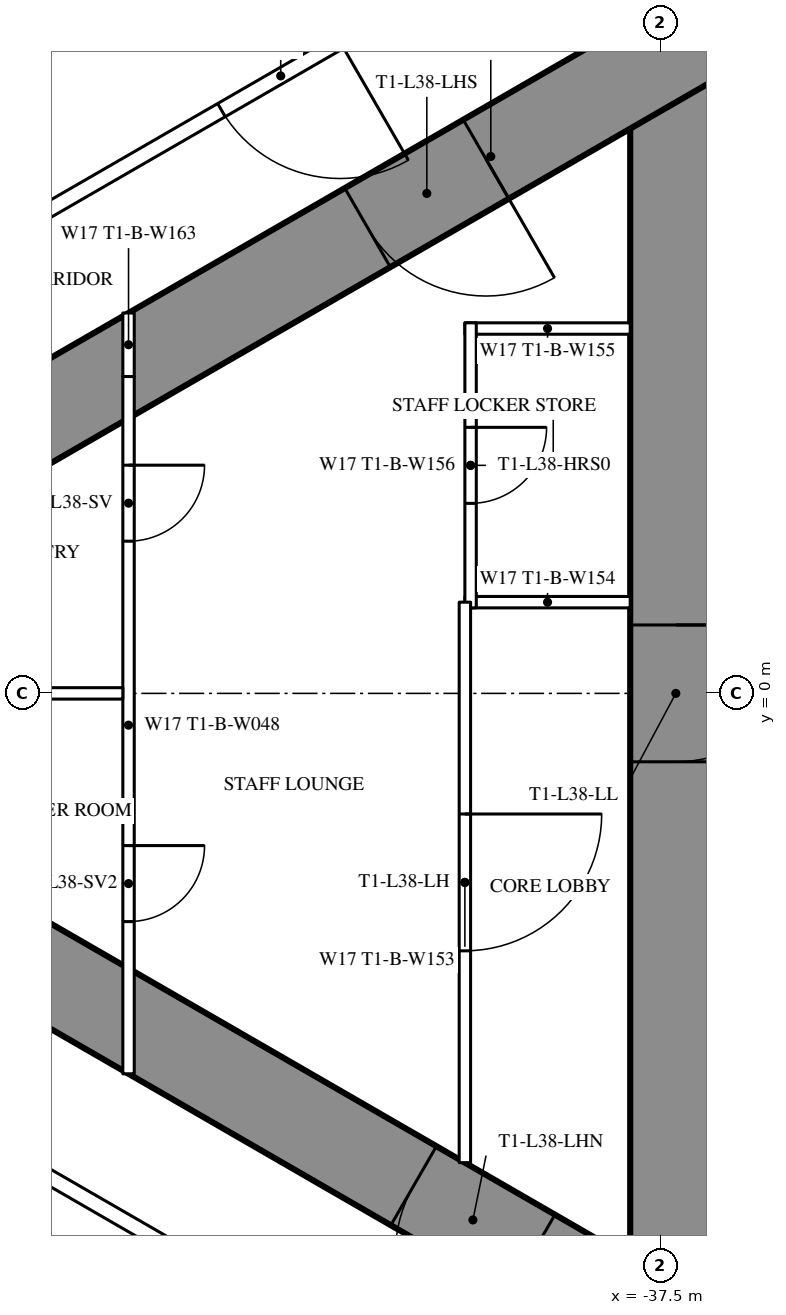
"""IFC4 building model, lengths in metres.
Left out: names, types, materials, properties, quantities, classifications, styles, units other than length and angle.
Written with IfcOpenShell. Run it as: python <this file> out.ifc"""

import sys

from ifc_helpers import new_model, si_unit, direction, frame, frame_2d, origin, place, context, subcontext, project, spatial, rectangle, extrude, element, fill, save


model = new_model("IFC4")
c1 = context("Model", 3, precision=1e-05, world=origin(), true_north=direction((0.0, 1.0)))
c2 = subcontext(c1, "Body", "Model", "MODEL_VIEW")
j1 = project(units=[si_unit("LENGTHUNIT", "METRE"), si_unit("PLANEANGLEUNIT", "RADIAN")], contexts=[c1])
p1 = place(None, origin())
s1 = spatial("IfcSite", under=j1, at=p1, CompositionType="ELEMENT")
p2 = place(p1, origin())
s2 = spatial("IfcBuilding", under=s1, at=p2, CompositionType="ELEMENT")
p3 = place(p2, frame((0.0, 0.0, 143.1)))
s3 = spatial("IfcBuildingStorey", under=s2, at=p3, CompositionType="ELEMENT", Elevation=143.1)
p4 = place(p3, frame((-37.3, 8.6, 0.0), z_axis=(0.0, 0.0, 1.0), x_axis=(0.0, -1.0, 0.0)))
e1 = element("IfcWall", 1, at=p4, inside=s3, PredefinedType="SHEAR", context=c2, shape_type="SweptSolid", body=[
    extrude(rectangle(XDim=17.2, YDim=1.2, at=frame_2d((8.6, 0.0))), origin(), (0.0, 0.0, 1.0), 3.6),
])
p5 = place(p4, frame((7.7, 0.0, 0.0)))
e2 = element("IfcOpeningElement", 2, at=p5, cuts=e1, PredefinedType="OPENING", context=c2, shape_type="SweptSolid", body=[
    extrude(rectangle(XDim=1.8, YDim=2.2, at=frame_2d((0.9, 1.1))), frame((0.0, 0.61, 0.0), z_axis=(0.0, -1.0, 0.0), x_axis=(1.0, 0.0, 0.0)), (0.0, 0.0, 1.0), 1.22),
])
p6 = place(p3, frame((-27.2, 14.3, 0.0), z_axis=(0.0, 0.0, 1.0), x_axis=(-0.866026593062, -0.499997940104, 0.0)))
e3 = element("IfcWall", 3, at=p6, inside=s3, PredefinedType="SHEAR", context=c2, shape_type="SweptSolid", body=[
    extrude(rectangle(XDim=28.946, YDim=1.2, at=frame_2d((14.473, 0.0))), origin(), (0.0, 0.0, 1.0), 3.6),
])
p7 = place(p6, frame((4.6, 0.0, 0.0)))
e4 = element("IfcOpeningElement", 4, at=p7, cuts=e3, PredefinedType="OPENING", context=c2, shape_type="SweptSolid", body=[
    extrude(rectangle(XDim=1.0, YDim=2.2, at=frame_2d((0.5, 1.1))), frame((0.0, 0.61, 0.0), z_axis=(0.0, -1.0, 0.0), x_axis=(1.0, 0.0, 0.0)), (0.0, 0.0, 1.0), 1.22),
])
p8 = place(p6, frame((14.545, 0.0, 0.0)))
e5 = element("IfcOpeningElement", 5, at=p8, cuts=e3, PredefinedType="OPENING", context=c2, shape_type="SweptSolid", body=[
    extrude(rectangle(XDim=1.8, YDim=2.2, at=frame_2d((0.9, 1.1))), frame((0.0, 0.61, 0.0), z_axis=(0.0, -1.0, 0.0), x_axis=(1.0, 0.0, 0.0)), (0.0, 0.0, 1.0), 1.22),
])
p9 = place(p3, frame((-27.2, -14.3, 0.0), z_axis=(0.0, 0.0, 1.0), x_axis=(-0.866024021859, 0.500002393557, 0.0)))
e6 = element("IfcWall", 6, at=p9, inside=s3, PredefinedType="SHEAR", context=c2, shape_type="SweptSolid", body=[
    extrude(rectangle(XDim=27.907, YDim=1.2, at=frame_2d((13.954, 0.0))), origin(), (0.0, 0.0, 1.0), 3.6),
])
p10 = place(p9, frame((4.6, 0.0, 0.0)))
e7 = element("IfcOpeningElement", 7, at=p10, cuts=e6, PredefinedType="OPENING", context=c2, shape_type="SweptSolid", body=[
    extrude(rectangle(XDim=1.0, YDim=2.2, at=frame_2d((0.5, 1.1))), frame((0.0, 0.61, 0.0), z_axis=(0.0, -1.0, 0.0), x_axis=(1.0, 0.0, 0.0)), (0.0, 0.0, 1.0), 1.22),
])
p11 = place(p9, frame((13.845, 0.0, 0.0)))
e8 = element("IfcOpeningElement", 8, at=p11, cuts=e6, PredefinedType="OPENING", context=c2, shape_type="SweptSolid", body=[
    extrude(rectangle(XDim=1.8, YDim=2.2, at=frame_2d((0.9, 1.1))), frame((0.0, 0.61, 0.0), z_axis=(0.0, -1.0, 0.0), x_axis=(1.0, 0.0, 0.0)), (0.0, 0.0, 1.0), 1.22),
])
p12 = place(p3, frame((-37.7, 10.894, 0.0), z_axis=(0.0, 0.0, 1.0), x_axis=(-0.866027905338, -0.499995667157, 0.0)))
e9 = element("IfcWall", 9, at=p12, inside=s3, PredefinedType="PARTITIONING", context=c2, shape_type="SweptSolid", body=[
    extrude(rectangle(XDim=21.787, YDim=0.2, at=frame_2d((10.894, 0.0))), origin(), (0.0, 0.0, 1.0), 3.35),
])
p13 = place(p12, frame((14.296, 0.0, 0.0)))
e10 = element("IfcOpeningElement", 10, at=p13, cuts=e9, PredefinedType="OPENING", context=c2, shape_type="SweptSolid", body=[
    extrude(rectangle(XDim=1.8, YDim=2.2, at=frame_2d((0.9, 1.1))), frame((0.0, 0.11, 0.0), z_axis=(0.0, -1.0, 0.0), x_axis=(1.0, 0.0, 0.0)), (0.0, 0.0, 1.0), 0.22),
])
p14 = place(p12, frame((19.399, 0.0, 0.0)))
e11 = element("IfcOpeningElement", 11, at=p14, cuts=e9, PredefinedType="OPENING", context=c2, shape_type="SweptSolid", body=[
    extrude(rectangle(XDim=1.8, YDim=2.14, at=frame_2d((0.9, 1.07))), frame((0.0, 0.11, 0.0), z_axis=(0.0, -1.0, 0.0), x_axis=(1.0, 0.0, 0.0)), (0.0, 0.0, 1.0), 0.22),
])
p15 = place(p12, frame((4.64, 0.0, 0.0)))
e12 = element("IfcOpeningElement", 12, at=p15, cuts=e9, PredefinedType="OPENING", context=c2, shape_type="SweptSolid", body=[
    extrude(rectangle(XDim=1.8, YDim=2.2, at=frame_2d((0.9, 1.1))), frame((0.0, 0.11, 0.0), z_axis=(0.0, -1.0, 0.0), x_axis=(1.0, 0.0, 0.0)), (0.0, 0.0, 1.0), 0.22),
])
p16 = place(p3, frame((-36.92, -11.344, 0.0), z_axis=(0.0, 0.0, 1.0), x_axis=(-0.866028313256, 0.499994960614, 0.0)))
e13 = element("IfcWall", 13, at=p16, inside=s3, PredefinedType="PARTITIONING", context=c2, shape_type="SweptSolid", body=[
    extrude(rectangle(XDim=22.568, YDim=0.2, at=frame_2d((11.284, 0.0))), origin(), (0.0, 0.0, 1.0), 3.35),
])
p17 = place(p16, frame((20.24, 0.0, 0.0)))
e14 = element("IfcOpeningElement", 14, at=p17, cuts=e13, PredefinedType="OPENING", context=c2, shape_type="SweptSolid", body=[
    extrude(rectangle(XDim=1.8, YDim=2.14, at=frame_2d((0.9, 1.07))), frame((0.0, 0.11, 0.0), z_axis=(0.0, -1.0, 0.0), x_axis=(1.0, 0.0, 0.0)), (0.0, 0.0, 1.0), 0.22),
])
p18 = place(p16, frame((14.946, 0.0, 0.0)))
e15 = element("IfcOpeningElement", 15, at=p18, cuts=e13, PredefinedType="OPENING", context=c2, shape_type="SweptSolid", body=[
    extrude(rectangle(XDim=1.8, YDim=2.2, at=frame_2d((0.9, 1.1))), frame((0.0, 0.11, 0.0), z_axis=(0.0, -1.0, 0.0), x_axis=(1.0, 0.0, 0.0)), (0.0, 0.0, 1.0), 0.22),
])
p19 = place(p16, frame((5.091, 0.0, 0.0)))
e16 = element("IfcOpeningElement", 16, at=p19, cuts=e13, PredefinedType="OPENING", context=c2, shape_type="SweptSolid", body=[
    extrude(rectangle(XDim=1.8, YDim=2.2, at=frame_2d((0.9, 1.1))), frame((0.0, 0.11, 0.0), z_axis=(0.0, -1.0, 0.0), x_axis=(1.0, 0.0, 0.0)), (0.0, 0.0, 1.0), 0.22),
])
for number, where, z_axis, x_axis in (
    (17, (-37.9, 1.2, 0.0), (0.0, 0.0, 1.0), (-1.0, 0.0, 0.0)),
    (18, (-37.9, 4.8, 0.0), (0.0, 0.0, 1.0), (-1.0, 0.0, 0.0)),
):
    element("IfcWall", number, at=place(p3, frame(where, z_axis=z_axis, x_axis=x_axis)), inside=s3, PredefinedType="PARTITIONING", context=c2, shape_type="SweptSolid", body=[
        extrude(rectangle(XDim=2.175, YDim=0.15, at=frame_2d((1.087, 0.0))), origin(), (0.0, 0.0, 1.0), 3.35),
    ])
p20 = place(p3, frame((-40.0, 4.875, 0.0), z_axis=(0.0, 0.0, 1.0), x_axis=(0.0, -1.0, 0.0)))
e19 = element("IfcWall", 19, at=p20, inside=s3, PredefinedType="PARTITIONING", context=c2, shape_type="SweptSolid", body=[
    extrude(rectangle(XDim=3.75, YDim=0.15, at=frame_2d((1.875, 0.0))), origin(), (0.0, 0.0, 1.0), 3.35),
])
p21 = place(p20, frame((1.375, 0.0, 0.0)))
e20 = element("IfcOpeningElement", 20, at=p21, cuts=e19, PredefinedType="OPENING", context=c2, shape_type="SweptSolid", body=[
    extrude(rectangle(XDim=1.0, YDim=2.2, at=frame_2d((0.5, 1.1))), frame((0.0, 0.085, 0.0), z_axis=(0.0, -1.0, 0.0), x_axis=(1.0, 0.0, 0.0)), (0.0, 0.0, 1.0), 0.17),
])
p22 = place(p3, frame((-40.075, 1.2, 0.0), z_axis=(0.0, 0.0, 1.0), x_axis=(0.0, -1.0, 0.0)))
e21 = element("IfcWall", 21, at=p22, inside=s3, PredefinedType="PARTITIONING", context=c2, shape_type="SweptSolid", body=[
    extrude(rectangle(XDim=7.374, YDim=0.15, at=frame_2d((3.687, 0.0))), origin(), (0.0, 0.0, 1.0), 3.35),
])
p23 = place(p22, frame((2.787, 0.0, 0.0)))
e22 = element("IfcOpeningElement", 22, at=p23, cuts=e21, PredefinedType="OPENING", context=c2, shape_type="SweptSolid", body=[
    extrude(rectangle(XDim=1.8, YDim=2.2, at=frame_2d((0.9, 1.1))), frame((0.0, 0.085, 0.0), z_axis=(0.0, -1.0, 0.0), x_axis=(1.0, 0.0, 0.0)), (0.0, 0.0, 1.0), 0.17),
])
p24 = place(p3, frame((-44.5, 4.169, 0.0), z_axis=(0.0, 0.0, 1.0), x_axis=(0.0, -1.0, 0.0)))
e23 = element("IfcWall", 23, at=p24, inside=s3, PredefinedType="PARTITIONING", context=c2, shape_type="SweptSolid", body=[
    extrude(rectangle(XDim=9.173, YDim=0.15, at=frame_2d((4.587, 0.0))), origin(), (0.0, 0.0, 1.0), 3.35),
])
p25 = place(p24, frame((1.167, 0.0, 0.0)))
e24 = element("IfcOpeningElement", 24, at=p25, cuts=e23, PredefinedType="OPENING", context=c2, shape_type="SweptSolid", body=[
    extrude(rectangle(XDim=1.0, YDim=2.2, at=frame_2d((0.5, 1.1))), frame((0.0, 0.085, 0.0), z_axis=(0.0, -1.0, 0.0), x_axis=(1.0, 0.0, 0.0)), (0.0, 0.0, 1.0), 0.17),
])
p26 = place(p24, frame((6.171, 0.0, 0.0)))
e25 = element("IfcOpeningElement", 25, at=p26, cuts=e23, PredefinedType="OPENING", context=c2, shape_type="SweptSolid", body=[
    extrude(rectangle(XDim=1.0, YDim=2.2, at=frame_2d((0.5, 1.1))), frame((0.0, 0.085, 0.0), z_axis=(0.0, -1.0, 0.0), x_axis=(1.0, 0.0, 0.0)), (0.0, 0.0, 1.0), 0.17),
])
p27 = place(p3, frame((-44.575, 0.0, 0.0), z_axis=(0.0, 0.0, 1.0), x_axis=(-1.0, 0.0, 0.0)))
e26 = element("IfcWall", 26, at=p27, inside=s3, PredefinedType="PARTITIONING", context=c2, shape_type="SweptSolid", body=[
    extrude(rectangle(XDim=8.593, YDim=0.15, at=frame_2d((4.297, 0.0))), origin(), (0.0, 0.0, 1.0), 2.15),
])
p28 = place(p3, frame((-44.5, 5.005, 0.0), z_axis=(0.0, 0.0, 1.0), x_axis=(0.0, -1.0, 0.0)))
e27 = element("IfcWall", 27, at=p28, inside=s3, PredefinedType="PARTITIONING", context=c2, shape_type="SweptSolid", body=[
    extrude(rectangle(XDim=0.836, YDim=0.15, at=frame_2d((0.418, 0.0))), origin(), (0.0, 0.0, 1.0), 2.15),
])
p29 = place(p15, origin())
e28 = element("IfcDoor", 28, at=p29, inside=s3, OperationType="DOUBLE_DOOR_SINGLE_SWING", PredefinedType="DOOR", context=c2, shape_type="SweptSolid", body=[
    extrude(rectangle(XDim=1.8, YDim=2.2, at=frame_2d((0.9, 1.1))), frame((0.0, 0.025, 0.0), z_axis=(0.0, -1.0, 0.0), x_axis=(1.0, 0.0, 0.0)), (0.0, 0.0, 1.0), 0.05),
])
fill(e12, e28)
p30 = place(p21, origin())
e29 = element("IfcDoor", 29, at=p30, inside=s3, OperationType="SINGLE_SWING_LEFT", PredefinedType="DOOR", context=c2, shape_type="SweptSolid", body=[
    extrude(rectangle(XDim=1.0, YDim=2.2, at=frame_2d((0.5, 1.1))), frame((0.0, 0.025, 0.0), z_axis=(0.0, -1.0, 0.0), x_axis=(1.0, 0.0, 0.0)), (0.0, 0.0, 1.0), 0.05),
])
fill(e20, e29)
p31 = place(p23, origin())
e30 = element("IfcDoor", 30, at=p31, inside=s3, OperationType="DOUBLE_DOOR_SINGLE_SWING", PredefinedType="DOOR", context=c2, shape_type="SweptSolid", body=[
    extrude(rectangle(XDim=1.8, YDim=2.2, at=frame_2d((0.9, 1.1))), frame((0.0, 0.025, 0.0), z_axis=(0.0, -1.0, 0.0), x_axis=(1.0, 0.0, 0.0)), (0.0, 0.0, 1.0), 0.05),
])
fill(e22, e30)
p32 = place(p25, origin())
e31 = element("IfcDoor", 31, at=p32, inside=s3, OperationType="SINGLE_SWING_LEFT", PredefinedType="DOOR", context=c2, shape_type="SweptSolid", body=[
    extrude(rectangle(XDim=1.0, YDim=2.2, at=frame_2d((0.5, 1.1))), frame((0.0, 0.025, 0.0), z_axis=(0.0, -1.0, 0.0), x_axis=(1.0, 0.0, 0.0)), (0.0, 0.0, 1.0), 0.05),
])
fill(e24, e31)
p33 = place(p26, origin())
e32 = element("IfcDoor", 32, at=p33, inside=s3, OperationType="SINGLE_SWING_LEFT", PredefinedType="DOOR", context=c2, shape_type="SweptSolid", body=[
    extrude(rectangle(XDim=1.0, YDim=2.2, at=frame_2d((0.5, 1.1))), frame((0.0, 0.025, 0.0), z_axis=(0.0, -1.0, 0.0), x_axis=(1.0, 0.0, 0.0)), (0.0, 0.0, 1.0), 0.05),
])
fill(e25, e32)
p34 = place(p8, origin())
e33 = element("IfcDoor", 33, at=p34, inside=s3, OperationType="DOUBLE_DOOR_SINGLE_SWING", PredefinedType="DOOR", context=c2, shape_type="SweptSolid", body=[
    extrude(rectangle(XDim=1.8, YDim=2.2, at=frame_2d((0.9, 1.1))), frame((0.0, 0.025, 0.0), z_axis=(0.0, -1.0, 0.0), x_axis=(1.0, 0.0, 0.0)), (0.0, 0.0, 1.0), 0.05),
])
fill(e5, e33)
p35 = place(p11, origin())
e34 = element("IfcDoor", 34, at=p35, inside=s3, OperationType="DOUBLE_DOOR_SINGLE_SWING", PredefinedType="DOOR", context=c2, shape_type="SweptSolid", body=[
    extrude(rectangle(XDim=1.8, YDim=2.2, at=frame_2d((0.9, 1.1))), frame((0.0, 0.025, 0.0), z_axis=(0.0, -1.0, 0.0), x_axis=(1.0, 0.0, 0.0)), (0.0, 0.0, 1.0), 0.05),
])
fill(e8, e34)
p36 = place(p5, origin())
e35 = element("IfcDoor", 35, at=p36, inside=s3, OperationType="DOUBLE_DOOR_SINGLE_SWING", PredefinedType="DOOR", context=c2, shape_type="SweptSolid", body=[
    extrude(rectangle(XDim=1.8, YDim=2.2, at=frame_2d((0.9, 1.1))), frame((0.0, 0.025, 0.0), z_axis=(0.0, -1.0, 0.0), x_axis=(1.0, 0.0, 0.0)), (0.0, 0.0, 1.0), 0.05),
])
fill(e2, e35)
save(model, sys.argv[1])
